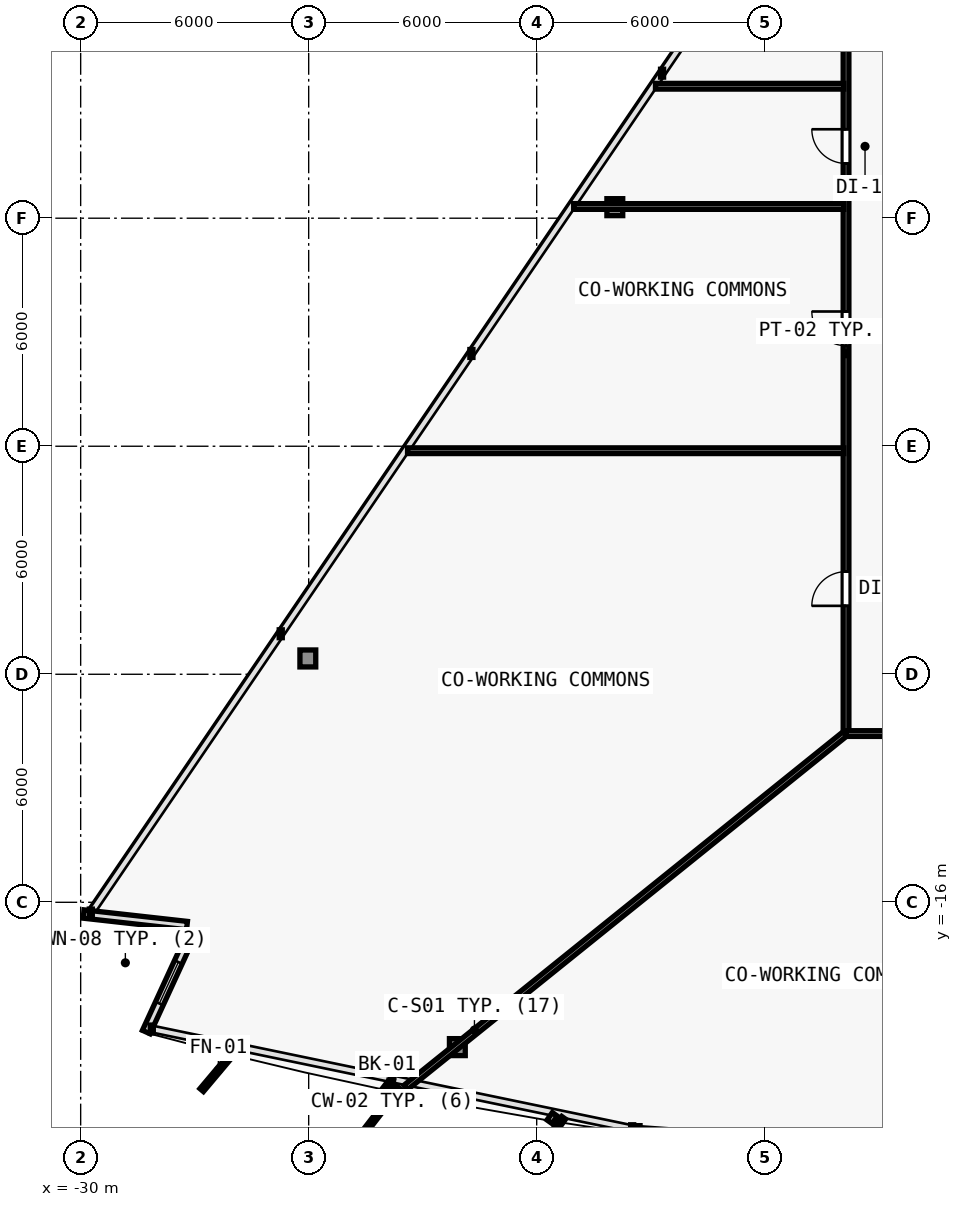
"""IFC4 building model, lengths in metres.
Left out: names, types, materials, properties, quantities, classifications, styles, units other than length and angle.
Written with IfcOpenShell. Run it as: python <this file> out.ifc"""

import sys

from ifc_helpers import new_model, si_unit, direction, frame, frame_2d, origin, origin_2d, place, context, subcontext, project, spatial, rectangle, i_section, extrude, element, fill, save


model = new_model("IFC4")
c1 = context("Model", 3, precision=1e-05, world=origin(), true_north=direction((0.0, 1.0)))
c2 = subcontext(c1, "Body", "Model", "MODEL_VIEW")
j1 = project(units=[si_unit("LENGTHUNIT", "METRE"), si_unit("PLANEANGLEUNIT", "RADIAN")], contexts=[c1])
p1 = place(None, origin())
s1 = spatial("IfcSite", under=j1, at=p1, CompositionType="ELEMENT")
p2 = place(p1, origin())
s2 = spatial("IfcBuilding", under=s1, at=p2, CompositionType="ELEMENT")
p3 = place(p2, frame((0.0, 0.0, 40.8)))
s3 = spatial("IfcBuildingStorey", under=s2, at=p3, CompositionType="ELEMENT", Elevation=40.8)
p4 = place(p3, frame((-20.088, -19.811, 0.005), z_axis=(0.021205716244, 0.034391321857, 0.999183443908), x_axis=(-0.851195920716, 0.524848077596, 0.0)))
e1 = element("IfcColumn", 1, at=p4, inside=s3, PredefinedType="COLUMN", context=c2, shape_type="SweptSolid", body=[
    extrude(i_section(OverallWidth=0.416, OverallDepth=0.446, WebThickness=0.025, FlangeThickness=0.04, FilletRadius=0.015, at=origin_2d()), origin(), (0.0, 0.0, 1.0), 3.592),
])
p5 = place(p3, frame((-15.944, 2.291, 0.005), z_axis=(0.017478295015, 0.009793285923, 0.999799280233), x_axis=(-0.488810085697, 0.87239022239, 0.0)))
e2 = element("IfcColumn", 2, at=p5, inside=s3, PredefinedType="COLUMN", context=c2, shape_type="SweptSolid", body=[
    extrude(i_section(OverallWidth=0.416, OverallDepth=0.446, WebThickness=0.025, FlangeThickness=0.04, FilletRadius=0.015, at=origin_2d()), origin(), (0.0, 0.0, 1.0), 3.59),
])
p6 = place(p3, frame((-24.022, -9.584, 0.005), z_axis=(0.025969439617, 0.022230384175, 0.999415528309), x_axis=(-0.65029991508, 0.759677576638, 0.0)))
e3 = element("IfcColumn", 3, at=p6, inside=s3, PredefinedType="COLUMN", context=c2, shape_type="SweptSolid", body=[
    extrude(i_section(OverallWidth=0.416, OverallDepth=0.446, WebThickness=0.025, FlangeThickness=0.04, FilletRadius=0.015, at=origin_2d()), origin(), (0.0, 0.0, 1.0), 3.591),
])
p7 = place(p3, frame((-27.202, -16.612, 0.0), z_axis=(0.0, 0.0, 1.0), x_axis=(-0.993822658088, 0.110979837223, 0.0)))
e4 = element("IfcWall", 4, at=p7, inside=s3, PredefinedType="SOLIDWALL", context=c2, shape_type="SweptSolid", body=[
    extrude(rectangle(XDim=2.737, YDim=0.22, at=frame_2d((1.368, 0.0))), origin(), (0.0, 0.0, 1.0), 3.35),
])
p8 = place(p3, frame((-28.274, -19.414, 0.0), z_axis=(0.0, 0.0, 1.0), x_axis=(0.417521186742, 0.908667188041, 0.0)))
e5 = element("IfcWall", 5, at=p8, inside=s3, PredefinedType="SOLIDWALL", context=c2, shape_type="SweptSolid", body=[
    extrude(rectangle(XDim=2.852, YDim=0.22, at=frame_2d((1.426, 0.0))), origin(), (0.0, 0.0, 1.0), 3.35),
])
p9 = place(p8, frame((0.826, 0.0, 0.62)))
e6 = element("IfcOpeningElement", 6, at=p9, cuts=e5, PredefinedType="OPENING", context=c2, shape_type="SweptSolid", body=[
    extrude(rectangle(XDim=1.2, YDim=1.8, at=frame_2d((0.6, 0.9))), frame((0.0, 0.12, 0.0), z_axis=(0.0, -1.0, 0.0), x_axis=(1.0, 0.0, 0.0)), (0.0, 0.0, 1.0), 0.24),
])
p10 = place(p3, frame((-9.86, -11.56, 0.0), z_axis=(0.0, 0.0, 1.0), x_axis=(0.0, 1.0, 0.0)))
e7 = element("IfcWall", 7, at=p10, inside=s3, PredefinedType="PARTITIONING", context=c2, shape_type="SweptSolid", body=[
    extrude(rectangle(XDim=19.986, YDim=0.15, at=frame_2d((9.993, 0.0))), origin(), (0.0, 0.0, 1.0), 2.609),
])
p11 = place(p10, frame((10.205, 0.0, 0.0)))
e8 = element("IfcOpeningElement", 8, at=p11, cuts=e7, PredefinedType="OPENING", context=c2, shape_type="SweptSolid", body=[
    extrude(rectangle(XDim=0.9, YDim=2.1, at=frame_2d((0.45, 1.05))), frame((0.0, 0.085, 0.0), z_axis=(0.0, -1.0, 0.0), x_axis=(1.0, 0.0, 0.0)), (0.0, 0.0, 1.0), 0.17),
])
p12 = place(p10, frame((3.36, 0.0, 0.0)))
e9 = element("IfcOpeningElement", 9, at=p12, cuts=e7, PredefinedType="OPENING", context=c2, shape_type="SweptSolid", body=[
    extrude(rectangle(XDim=0.9, YDim=2.1, at=frame_2d((0.45, 1.05))), frame((0.0, 0.085, 0.0), z_axis=(0.0, -1.0, 0.0), x_axis=(1.0, 0.0, 0.0)), (0.0, 0.0, 1.0), 0.17),
])
p13 = place(p10, frame((17.97, 0.0, 0.0)))
e10 = element("IfcOpeningElement", 10, at=p13, cuts=e7, PredefinedType="OPENING", context=c2, shape_type="SweptSolid", body=[
    extrude(rectangle(XDim=0.9, YDim=2.1, at=frame_2d((0.45, 1.05))), frame((0.0, 0.085, 0.0), z_axis=(0.0, -1.0, 0.0), x_axis=(1.0, 0.0, 0.0)), (0.0, 0.0, 1.0), 0.17),
])
p14 = place(p10, frame((15.0, 0.0, 0.0)))
e11 = element("IfcOpeningElement", 11, at=p14, cuts=e7, PredefinedType="OPENING", context=c2, shape_type="SweptSolid", body=[
    extrude(rectangle(XDim=0.9, YDim=2.1, at=frame_2d((0.45, 1.05))), frame((0.0, 0.085, 0.0), z_axis=(0.0, -1.0, 0.0), x_axis=(1.0, 0.0, 0.0)), (0.0, 0.0, 1.0), 0.17),
])
p15 = place(p3, frame((-3.08, -11.56, 0.0), z_axis=(0.0, 0.0, 1.0), x_axis=(-1.0, 0.0, 0.0)))
e12 = element("IfcWall", 12, at=p15, inside=s3, PredefinedType="PARTITIONING", context=c2, shape_type="SweptSolid", body=[
    extrude(rectangle(XDim=6.78, YDim=0.15, at=frame_2d((3.39, 0.0))), origin(), (0.0, 0.0, 1.0), 2.609),
])
p16 = place(p15, frame((2.94, 0.0, 0.0)))
e13 = element("IfcOpeningElement", 13, at=p16, cuts=e12, PredefinedType="OPENING", context=c2, shape_type="SweptSolid", body=[
    extrude(rectangle(XDim=0.9, YDim=2.1, at=frame_2d((0.45, 1.05))), frame((0.0, 0.085, 0.0), z_axis=(0.0, -1.0, 0.0), x_axis=(1.0, 0.0, 0.0)), (0.0, 0.0, 1.0), 0.17),
])
p17 = place(p3, frame((-9.888, -11.569, 0.0), z_axis=(0.0, 0.0, 1.0), x_axis=(-0.778962871417, -0.627070047884, 0.0)))
e14 = element("IfcWall", 14, at=p17, inside=s3, PredefinedType="PARTITIONING", context=c2, shape_type="SweptSolid", body=[
    extrude(rectangle(XDim=14.837, YDim=0.15, at=frame_2d((7.418, 0.0))), origin(), (0.0, 0.0, 1.0), 2.609),
])
p18 = place(p3, frame((-9.92, 2.308, 0.0), z_axis=(0.0, 0.0, 1.0), x_axis=(-1.0, 0.0, 0.0)))
e15 = element("IfcWall", 15, at=p18, inside=s3, PredefinedType="PARTITIONING", context=c2, shape_type="SweptSolid", body=[
    extrude(rectangle(XDim=7.107, YDim=0.15, at=frame_2d((3.553, 0.0))), origin(), (0.0, 0.0, 1.0), 2.725),
])
p19 = place(p3, frame((-9.92, -4.118, 0.0), z_axis=(0.0, 0.0, 1.0), x_axis=(-1.0, 0.0, 0.0)))
e16 = element("IfcWall", 16, at=p19, inside=s3, PredefinedType="PARTITIONING", context=c2, shape_type="SweptSolid", body=[
    extrude(rectangle(XDim=11.478, YDim=0.15, at=frame_2d((5.739, 0.0))), origin(), (0.0, 0.0, 1.0), 2.735),
])
p20 = place(p3, frame((-9.92, 5.472, 0.0), z_axis=(0.0, 0.0, 1.0), x_axis=(-1.0, 0.0, 0.0)))
e17 = element("IfcWall", 17, at=p20, inside=s3, PredefinedType="PARTITIONING", context=c2, shape_type="SweptSolid", body=[
    extrude(rectangle(XDim=4.954, YDim=0.15, at=frame_2d((2.477, 0.0))), origin(), (0.0, 0.0, 1.0), 2.735),
])
p21 = place(p9, origin())
e18 = element("IfcWindow", 18, at=p21, inside=s3, PartitioningType="SINGLE_PANEL", PredefinedType="WINDOW", context=c2, shape_type="SweptSolid", body=[
    extrude(rectangle(XDim=1.2, YDim=1.8, at=frame_2d((0.6, 0.9))), frame((0.0, 0.03, 0.0), z_axis=(0.0, -1.0, 0.0), x_axis=(1.0, 0.0, 0.0)), (0.0, 0.0, 1.0), 0.06),
])
fill(e6, e18)
p22 = place(p11, origin())
e19 = element("IfcDoor", 19, at=p22, inside=s3, OperationType="SINGLE_SWING_RIGHT", PredefinedType="DOOR", context=c2, shape_type="SweptSolid", body=[
    extrude(rectangle(XDim=0.9, YDim=2.1, at=frame_2d((0.45, 1.05))), frame((0.0, 0.025, 0.0), z_axis=(0.0, -1.0, 0.0), x_axis=(1.0, 0.0, 0.0)), (0.0, 0.0, 1.0), 0.05),
])
fill(e8, e19)
p23 = place(p12, origin())
e20 = element("IfcDoor", 20, at=p23, inside=s3, OperationType="SINGLE_SWING_LEFT", PredefinedType="DOOR", context=c2, shape_type="SweptSolid", body=[
    extrude(rectangle(XDim=0.9, YDim=2.1, at=frame_2d((0.45, 1.05))), frame((0.0, 0.025, 0.0), z_axis=(0.0, -1.0, 0.0), x_axis=(1.0, 0.0, 0.0)), (0.0, 0.0, 1.0), 0.05),
])
fill(e9, e20)
p24 = place(p14, origin())
e21 = element("IfcDoor", 21, at=p24, inside=s3, OperationType="SINGLE_SWING_RIGHT", PredefinedType="DOOR", context=c2, shape_type="SweptSolid", body=[
    extrude(rectangle(XDim=0.9, YDim=2.1, at=frame_2d((0.45, 1.05))), frame((0.0, 0.025, 0.0), z_axis=(0.0, -1.0, 0.0), x_axis=(1.0, 0.0, 0.0)), (0.0, 0.0, 1.0), 0.05),
])
fill(e11, e21)
save(model, sys.argv[1])
